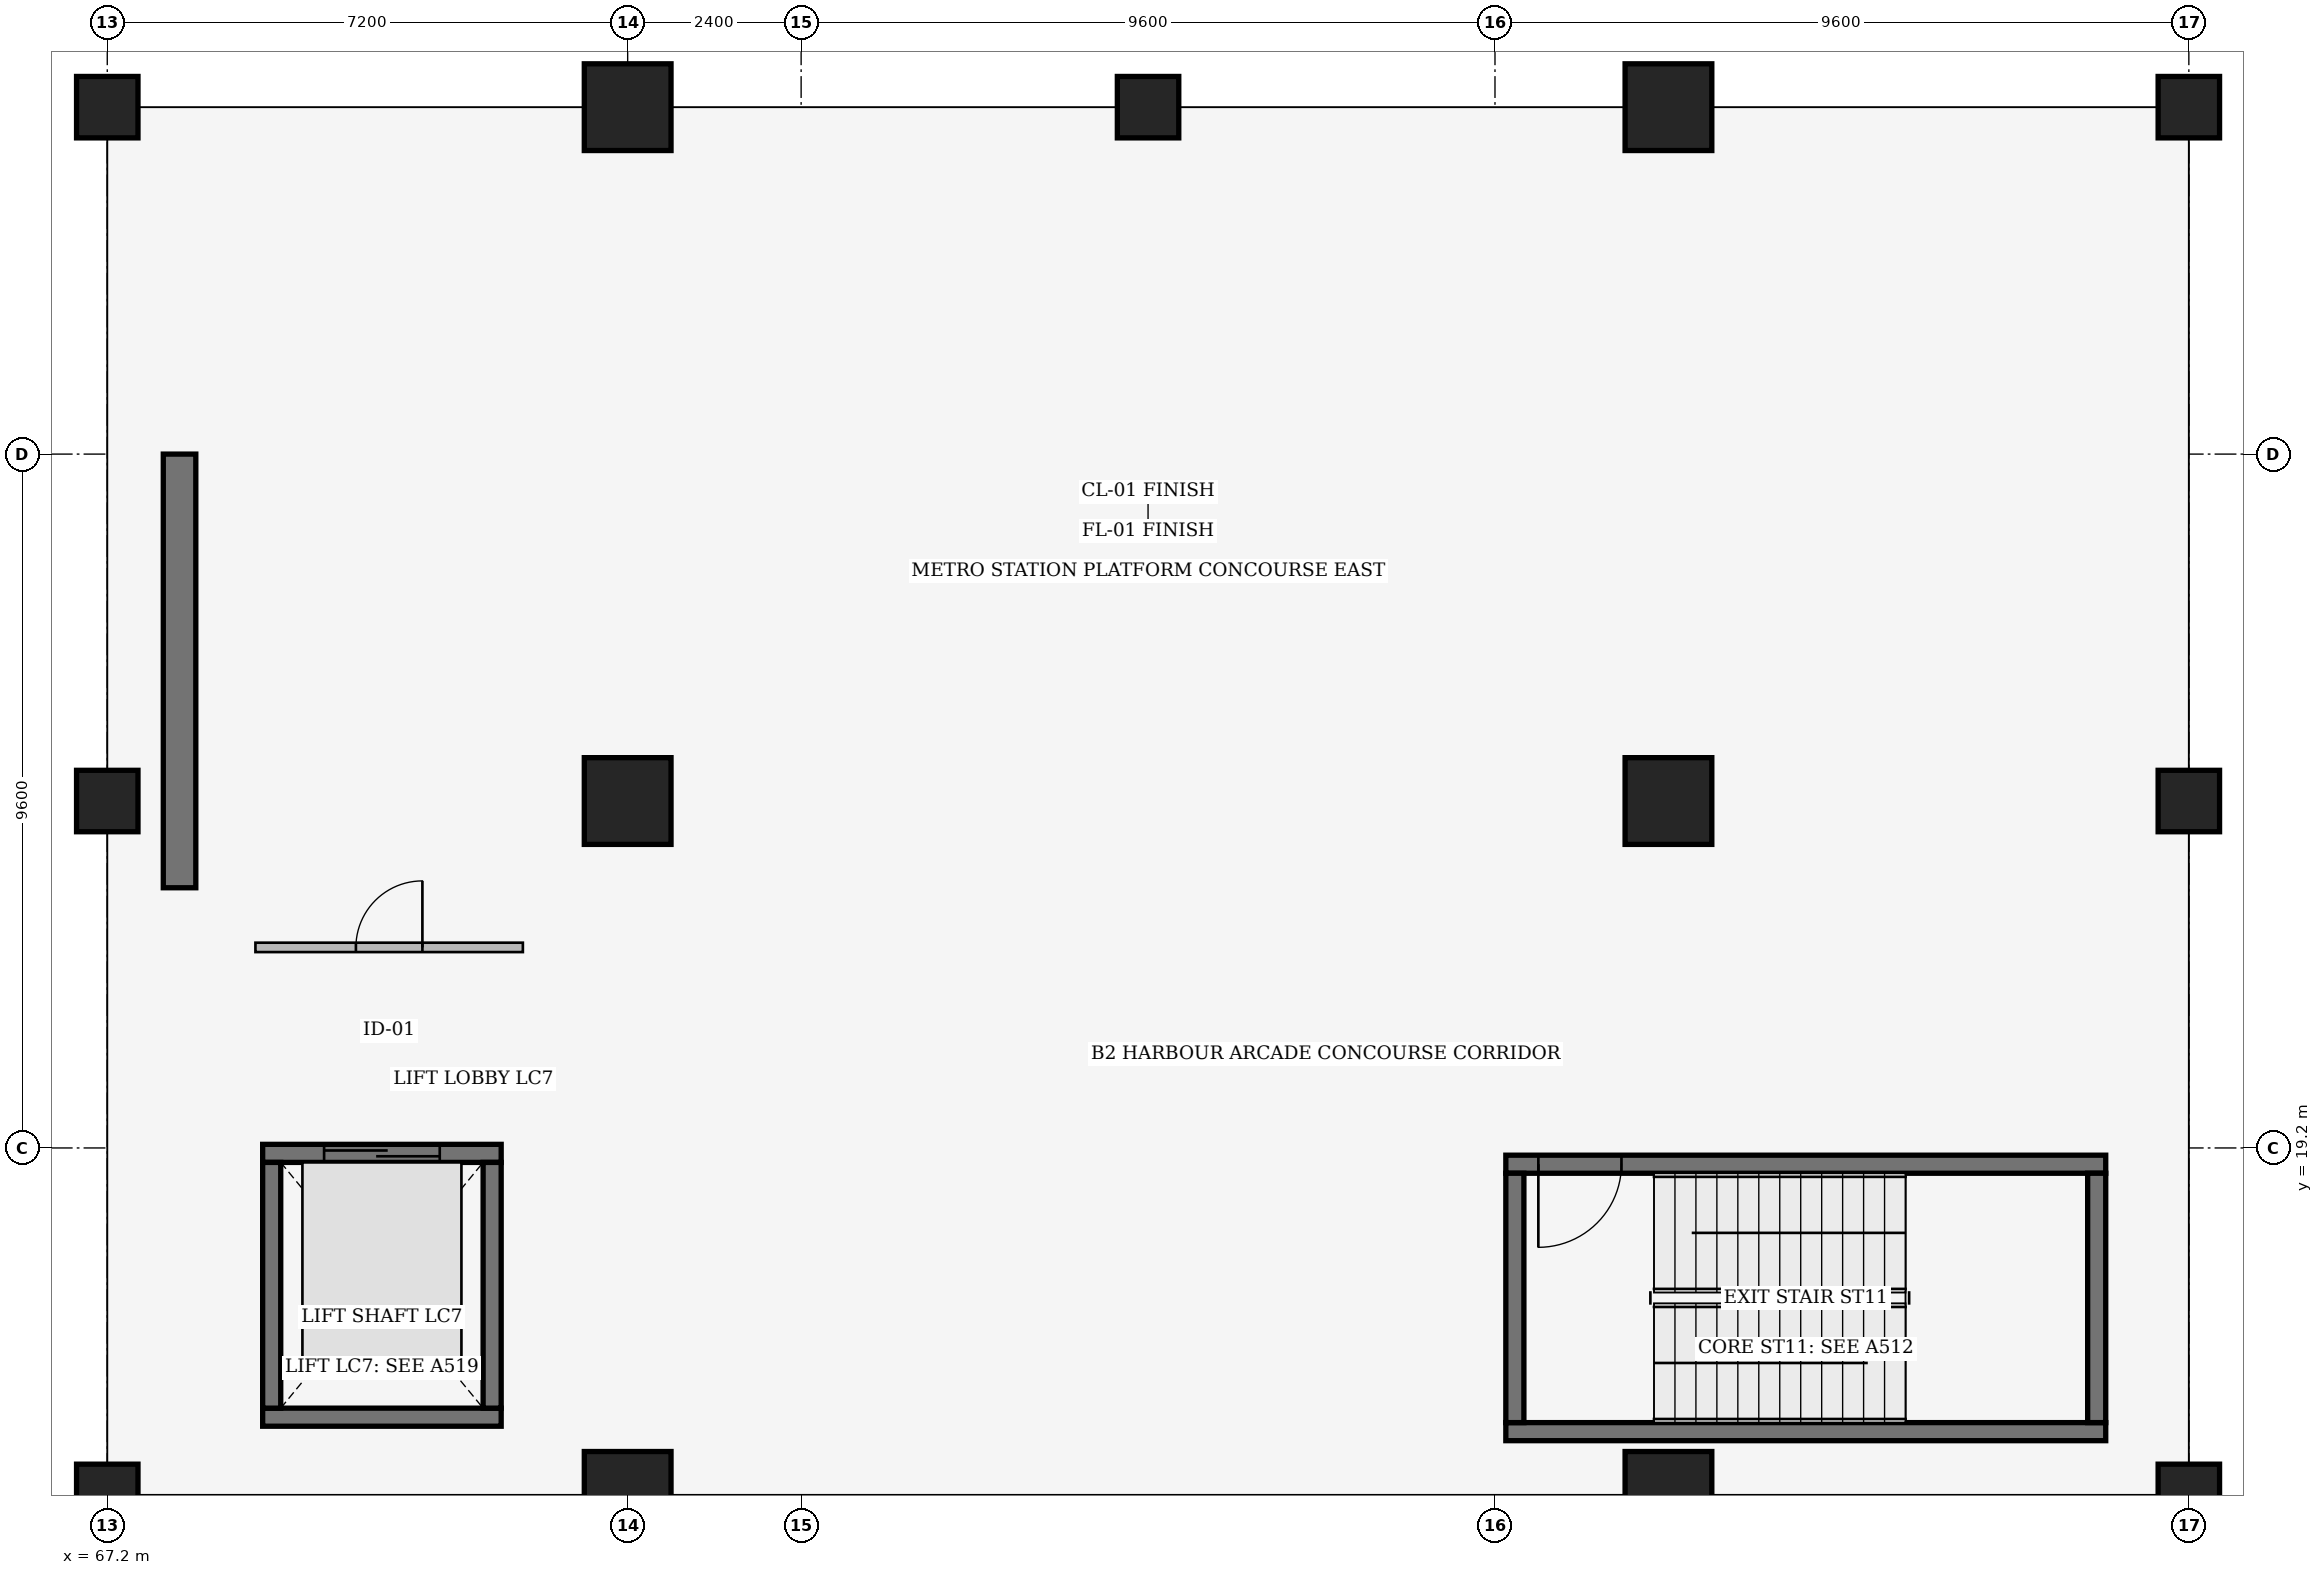
"""IFC4 building model, lengths in metres.
Left out: names, types, materials, properties, quantities, classifications, styles, units other than length and angle.
Written with IfcOpenShell. Run it as: python <this file> out.ifc"""

import sys

from ifc_helpers import new_model, si_unit, direction, frame, frame_2d, origin, origin_2d, place, context, subcontext, project, spatial, rectangle, extrude, element, fill, save


model = new_model("IFC4")
c1 = context("Model", 3, precision=1e-05, world=origin(), true_north=direction((0.0, 1.0)))
c2 = subcontext(c1, "Body", "Model", "MODEL_VIEW")
j1 = project(units=[si_unit("LENGTHUNIT", "METRE"), si_unit("PLANEANGLEUNIT", "RADIAN")], contexts=[c1])
p1 = place(None, origin())
s1 = spatial("IfcSite", under=j1, at=p1, CompositionType="ELEMENT")
p2 = place(p1, origin())
s2 = spatial("IfcBuilding", under=s1, at=p2, CompositionType="ELEMENT")
p3 = place(p2, frame((0.0, 0.0, -9.6)))
s3 = spatial("IfcBuildingStorey", under=s2, at=p3, CompositionType="ELEMENT", Elevation=-9.6)
for number, where, z_axis, x_axis in (
    (1, (67.2, 14.4, 0.0), (0.0, 0.0, 1.0), (1.0, 0.0, 0.0)),
    (2, (67.2, 24.0, 0.0), (0.0, 0.0, 1.0), (1.0, 0.0, 0.0)),
    (3, (67.2, 33.6, 0.0), (0.0, 0.0, 1.0), (1.0, 0.0, 0.0)),
):
    element("IfcColumn", number, at=place(p3, frame(where, z_axis=z_axis, x_axis=x_axis)), inside=s3, PredefinedType="COLUMN", context=c2, shape_type="SweptSolid", body=[
        extrude(rectangle(XDim=0.85, YDim=0.85, at=origin_2d()), origin(), (0.0, 0.0, 1.0), 4.8),
    ])
for number, where, z_axis, x_axis in (
    (4, (74.4, 14.4, 0.0), (0.0, 0.0, 1.0), (1.0, 0.0, 0.0)),
    (5, (74.4, 24.0, 0.0), (0.0, 0.0, 1.0), (1.0, 0.0, 0.0)),
    (6, (74.4, 33.6, 0.0), (0.0, 0.0, 1.0), (1.0, 0.0, 0.0)),
):
    element("IfcColumn", number, at=place(p3, frame(where, z_axis=z_axis, x_axis=x_axis)), inside=s3, PredefinedType="COLUMN", context=c2, shape_type="SweptSolid", body=[
        extrude(rectangle(XDim=1.2, YDim=1.2, at=origin_2d()), origin(), (0.0, 0.0, 1.0), 4.8),
    ])
p4 = place(p3, frame((81.6, 33.6, 0.0), z_axis=(0.0, 0.0, 1.0), x_axis=(1.0, 0.0, 0.0)))
e7 = element("IfcColumn", 7, at=p4, inside=s3, PredefinedType="COLUMN", context=c2, shape_type="SweptSolid", body=[
    extrude(rectangle(XDim=0.85, YDim=0.85, at=origin_2d()), origin(), (0.0, 0.0, 1.0), 4.8),
])
for number, where, z_axis, x_axis in (
    (8, (88.8, 14.4, 0.0), (0.0, 0.0, 1.0), (1.0, 0.0, 0.0)),
    (9, (88.8, 24.0, 0.0), (0.0, 0.0, 1.0), (1.0, 0.0, 0.0)),
    (10, (88.8, 33.6, 0.0), (0.0, 0.0, 1.0), (1.0, 0.0, 0.0)),
):
    element("IfcColumn", number, at=place(p3, frame(where, z_axis=z_axis, x_axis=x_axis)), inside=s3, PredefinedType="COLUMN", context=c2, shape_type="SweptSolid", body=[
        extrude(rectangle(XDim=1.2, YDim=1.2, at=origin_2d()), origin(), (0.0, 0.0, 1.0), 4.8),
    ])
for number, where, z_axis, x_axis in (
    (11, (96.0, 14.4, 0.0), (0.0, 0.0, 1.0), (1.0, 0.0, 0.0)),
    (12, (96.0, 24.0, 0.0), (0.0, 0.0, 1.0), (1.0, 0.0, 0.0)),
    (13, (96.0, 33.6, 0.0), (0.0, 0.0, 1.0), (1.0, 0.0, 0.0)),
):
    element("IfcColumn", number, at=place(p3, frame(where, z_axis=z_axis, x_axis=x_axis)), inside=s3, PredefinedType="COLUMN", context=c2, shape_type="SweptSolid", body=[
        extrude(rectangle(XDim=0.85, YDim=0.85, at=origin_2d()), origin(), (0.0, 0.0, 1.0), 4.8),
    ])
p5 = place(p3, frame((68.2, 22.8, 0.0), z_axis=(0.0, 0.0, 1.0), x_axis=(0.0, 1.0, 0.0)))
e14 = element("IfcWall", 14, at=p5, inside=s3, PredefinedType="SHEAR", context=c2, shape_type="SweptSolid", body=[
    extrude(rectangle(XDim=6.0, YDim=0.45, at=frame_2d((3.0, 0.0))), origin(), (0.0, 0.0, 1.0), 4.8),
])
p6 = place(p3, frame((86.55, 15.275, 0.0), z_axis=(0.0, 0.0, 1.0), x_axis=(1.0, 0.0, 0.0)))
e15 = element("IfcWall", 15, at=p6, inside=s3, PredefinedType="SHEAR", context=c2, shape_type="SweptSolid", body=[
    extrude(rectangle(XDim=8.3, YDim=0.25, at=frame_2d((4.15, 0.0))), origin(), (0.0, 0.0, 1.0), 4.5),
])
p7 = place(p3, frame((94.85, 18.975, 0.0), z_axis=(0.0, 0.0, 1.0), x_axis=(-1.0, 0.0, 0.0)))
e16 = element("IfcWall", 16, at=p7, inside=s3, PredefinedType="SHEAR", context=c2, shape_type="SweptSolid", body=[
    extrude(rectangle(XDim=8.3, YDim=0.25, at=frame_2d((4.15, 0.0))), origin(), (0.0, 0.0, 1.0), 4.5),
])
p8 = place(p7, frame((7.85, 0.0, 0.0), z_axis=(0.0, 0.0, 1.0), x_axis=(-1.0, 0.0, 0.0)))
e17 = element("IfcOpeningElement", 17, at=p8, cuts=e16, PredefinedType="OPENING", context=c2, shape_type="SweptSolid", body=[
    extrude(rectangle(XDim=1.15, YDim=2.2, at=frame_2d((0.575, 1.1))), frame((0.0, 0.135, 0.0), z_axis=(0.0, -1.0, 0.0), x_axis=(1.0, 0.0, 0.0)), (0.0, 0.0, 1.0), 0.27),
])
for number, where, z_axis, x_axis in (
    (18, (86.675, 18.85, 0.0), (0.0, 0.0, 1.0), (0.0, -1.0, 0.0)),
    (19, (94.725, 15.4, 0.0), (0.0, 0.0, 1.0), (0.0, 1.0, 0.0)),
):
    element("IfcWall", number, at=place(p3, frame(where, z_axis=z_axis, x_axis=x_axis)), inside=s3, PredefinedType="SHEAR", context=c2, shape_type="SweptSolid", body=[
        extrude(rectangle(XDim=3.45, YDim=0.25, at=frame_2d((1.725, 0.0))), origin(), (0.0, 0.0, 1.0), 4.5),
    ])
p9 = place(p3, frame((69.35, 15.475, 0.0), z_axis=(0.0, 0.0, 1.0), x_axis=(1.0, 0.0, 0.0)))
e20 = element("IfcWall", 20, at=p9, inside=s3, PredefinedType="SHEAR", context=c2, shape_type="SweptSolid", body=[
    extrude(rectangle(XDim=3.3, YDim=0.25, at=frame_2d((1.65, 0.0))), origin(), (0.0, 0.0, 1.0), 4.5),
])
p10 = place(p3, frame((69.35, 19.125, 0.0), z_axis=(0.0, 0.0, 1.0), x_axis=(1.0, 0.0, 0.0)))
e21 = element("IfcWall", 21, at=p10, inside=s3, PredefinedType="SHEAR", context=c2, shape_type="SweptSolid", body=[
    extrude(rectangle(XDim=3.3, YDim=0.25, at=frame_2d((1.65, 0.0))), origin(), (0.0, 0.0, 1.0), 4.5),
])
p11 = place(p10, frame((0.85, 0.0, 0.0)))
e22 = element("IfcOpeningElement", 22, at=p11, cuts=e21, PredefinedType="OPENING", context=c2, shape_type="SweptSolid", body=[
    extrude(rectangle(XDim=1.6, YDim=2.3, at=frame_2d((0.8, 1.15))), frame((0.0, 0.135, 0.0), z_axis=(0.0, -1.0, 0.0), x_axis=(1.0, 0.0, 0.0)), (0.0, 0.0, 1.0), 0.27),
])
for number, where, z_axis, x_axis in (
    (23, (69.475, 15.6, 0.0), (0.0, 0.0, 1.0), (0.0, 1.0, 0.0)),
    (24, (72.525, 15.6, 0.0), (0.0, 0.0, 1.0), (0.0, 1.0, 0.0)),
):
    element("IfcWall", number, at=place(p3, frame(where, z_axis=z_axis, x_axis=x_axis)), inside=s3, PredefinedType="SHEAR", context=c2, shape_type="SweptSolid", body=[
        extrude(rectangle(XDim=3.4, YDim=0.25, at=frame_2d((1.7, 0.0))), origin(), (0.0, 0.0, 1.0), 4.5),
    ])
p12 = place(p3, frame((69.25, 21.975, 0.0), z_axis=(0.0, 0.0, 1.0), x_axis=(1.0, 0.0, 0.0)))
e25 = element("IfcWall", 25, at=p12, inside=s3, PredefinedType="PARTITIONING", context=c2, shape_type="SweptSolid", body=[
    extrude(rectangle(XDim=3.7, YDim=0.13, at=frame_2d((1.85, 0.0))), origin(), (0.0, 0.0, 1.0), 4.049),
])
p13 = place(p12, frame((1.39, 0.0, 0.0)))
e26 = element("IfcOpeningElement", 26, at=p13, cuts=e25, PredefinedType="OPENING", context=c2, shape_type="SweptSolid", body=[
    extrude(rectangle(XDim=0.92, YDim=2.12, at=frame_2d((0.46, 1.06))), frame((0.0, 0.075, 0.0), z_axis=(0.0, -1.0, 0.0), x_axis=(1.0, 0.0, 0.0)), (0.0, 0.0, 1.0), 0.15),
])
p14 = place(p8, origin())
e27 = element("IfcDoor", 27, at=p14, inside=s3, OperationType="SINGLE_SWING_LEFT", PredefinedType="DOOR", context=c2, shape_type="SweptSolid", body=[
    extrude(rectangle(XDim=1.15, YDim=2.2, at=frame_2d((0.575, 1.1))), frame((0.0, 0.025, 0.0), z_axis=(0.0, -1.0, 0.0), x_axis=(1.0, 0.0, 0.0)), (0.0, 0.0, 1.0), 0.05),
])
fill(e17, e27)
p15 = place(p11, origin())
e28 = element("IfcDoor", 28, at=p15, inside=s3, OperationType="DOUBLE_DOOR_SLIDING", PredefinedType="DOOR", context=c2, shape_type="SweptSolid", body=[
    extrude(rectangle(XDim=1.6, YDim=2.3, at=frame_2d((0.8, 1.15))), frame((0.0, 0.025, 0.0), z_axis=(0.0, -1.0, 0.0), x_axis=(1.0, 0.0, 0.0)), (0.0, 0.0, 1.0), 0.05),
])
fill(e22, e28)
p16 = place(p13, origin())
e29 = element("IfcDoor", 29, at=p16, inside=s3, OperationType="SINGLE_SWING_RIGHT", PredefinedType="DOOR", context=c2, shape_type="SweptSolid", body=[
    extrude(rectangle(XDim=0.92, YDim=2.12, at=frame_2d((0.46, 1.06))), frame((0.0, 0.025, 0.0), z_axis=(0.0, -1.0, 0.0), x_axis=(1.0, 0.0, 0.0)), (0.0, 0.0, 1.0), 0.05),
])
fill(e26, e29)
save(model, sys.argv[1])
